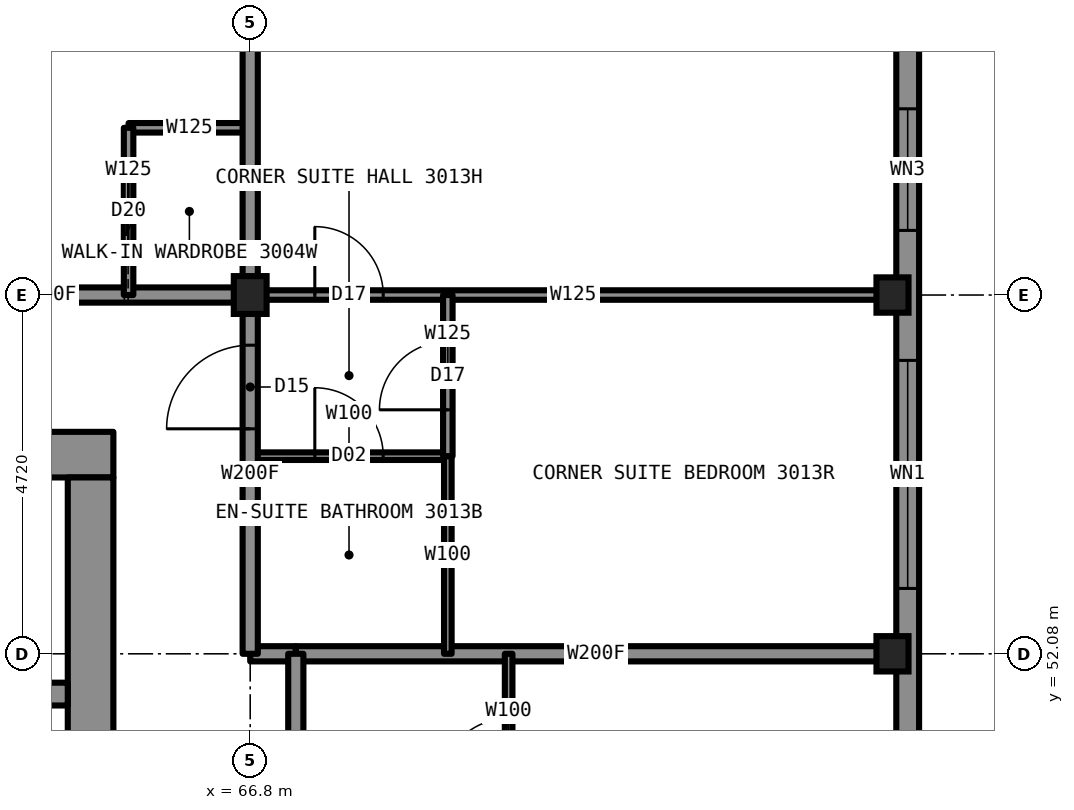
"""IFC4 building model, lengths in metres.
Left out: names, types, materials, properties, quantities, classifications, styles, units other than length and angle.
Written with IfcOpenShell. Run it as: python <this file> out.ifc"""

import sys

from ifc_helpers import new_model, si_unit, direction, frame, frame_2d, origin, origin_2d, place, context, subcontext, project, spatial, rectangle, i_section, extrude, element, fill, save


model = new_model("IFC4")
c1 = context("Model", 3, precision=1e-05, world=origin(), true_north=direction((0.0, 1.0)))
c2 = subcontext(c1, "Body", "Model", "MODEL_VIEW")
j1 = project(units=[si_unit("LENGTHUNIT", "METRE"), si_unit("PLANEANGLEUNIT", "RADIAN")], contexts=[c1])
p1 = place(None, origin())
s1 = spatial("IfcSite", under=j1, at=p1, CompositionType="ELEMENT")
p2 = place(p1, origin())
s2 = spatial("IfcBuilding", under=s1, at=p2, CompositionType="ELEMENT")
p3 = place(p2, frame((0.0, 0.0, 114.4)))
s3 = spatial("IfcBuildingStorey", under=s2, at=p3, CompositionType="ELEMENT", Elevation=114.4)
for number, where, z_axis, x_axis in (
    (1, (75.25, 52.08, 0.0), (0.0, 0.0, 1.0), (1.0, 0.0, 0.0)),
    (2, (75.25, 56.8, 0.0), (0.0, 0.0, 1.0), (1.0, 0.0, 0.0)),
):
    element("IfcColumn", number, at=place(p3, frame(where, z_axis=z_axis, x_axis=x_axis)), inside=s3, PredefinedType="COLUMN", context=c2, shape_type="SweptSolid", body=[
        extrude(i_section(OverallWidth=0.422, OverallDepth=0.465, WebThickness=0.045, FlangeThickness=0.073, at=origin_2d()), origin(), (0.0, 0.0, 1.0), 3.5),
    ])
p4 = place(p3, frame((66.8, 56.8, 0.0), z_axis=(0.0, 0.0, 1.0), x_axis=(1.0, 0.0, 0.0)))
e3 = element("IfcColumn", 3, at=p4, inside=s3, PredefinedType="COLUMN", context=c2, shape_type="SweptSolid", body=[
    extrude(i_section(OverallWidth=0.432, OverallDepth=0.498, WebThickness=0.056, FlangeThickness=0.089, at=origin_2d()), origin(), (0.0, 0.0, 1.0), 3.5),
])
p5 = place(p3, frame((45.0, 54.7, 0.0), z_axis=(0.0, 0.0, 1.0), x_axis=(1.0, 0.0, 0.0)))
e4 = element("IfcWall", 4, at=p5, inside=s3, PredefinedType="SHEAR", context=c2, shape_type="SweptSolid", body=[
    extrude(rectangle(XDim=20.0, YDim=0.6, at=frame_2d((10.0, 0.0))), origin(), (0.0, 0.0, 1.0), 3.5),
])
p6 = place(p3, frame((64.7, 35.6, 0.0), z_axis=(0.0, 0.0, 1.0), x_axis=(0.0, 1.0, 0.0)))
e5 = element("IfcWall", 5, at=p6, inside=s3, PredefinedType="SHEAR", context=c2, shape_type="SweptSolid", body=[
    extrude(rectangle(XDim=18.8, YDim=0.6, at=frame_2d((9.4, 0.0))), origin(), (0.0, 0.0, 1.0), 3.5),
])
p7 = place(p6, frame((13.4, 0.0, 0.0)))
e6 = element("IfcOpeningElement", 6, at=p7, cuts=e5, PredefinedType="OPENING", context=c2, shape_type="SweptSolid", body=[
    extrude(rectangle(XDim=1.8, YDim=2.2, at=frame_2d((0.9, 1.1))), frame((0.0, 0.31, 0.0), z_axis=(0.0, -1.0, 0.0), x_axis=(1.0, 0.0, 0.0)), (0.0, 0.0, 1.0), 0.62),
])
p8 = place(p6, frame((3.6, 0.0, 0.0)))
e7 = element("IfcOpeningElement", 7, at=p8, cuts=e5, PredefinedType="OPENING", context=c2, shape_type="SweptSolid", body=[
    extrude(rectangle(XDim=1.8, YDim=2.2, at=frame_2d((0.9, 1.1))), frame((0.0, 0.31, 0.0), z_axis=(0.0, -1.0, 0.0), x_axis=(1.0, 0.0, 0.0)), (0.0, 0.0, 1.0), 0.62),
])
p9 = place(p3, frame((45.6, 51.55, 0.0), z_axis=(0.0, 0.0, 1.0), x_axis=(1.0, 0.0, 0.0)))
e8 = element("IfcWall", 8, at=p9, inside=s3, PredefinedType="SHEAR", context=c2, shape_type="SweptSolid", body=[
    extrude(rectangle(XDim=18.8, YDim=0.3, at=frame_2d((9.4, 0.0))), origin(), (0.0, 0.0, 1.0), 3.5),
])
p10 = place(p9, frame((0.7, 0.0, 0.0)))
e9 = element("IfcOpeningElement", 9, at=p10, cuts=e8, PredefinedType="OPENING", context=c2, shape_type="SweptSolid", body=[
    extrude(rectangle(XDim=1.1, YDim=2.2, at=frame_2d((0.55, 1.1))), frame((0.0, 0.16, 0.0), z_axis=(0.0, -1.0, 0.0), x_axis=(1.0, 0.0, 0.0)), (0.0, 0.0, 1.0), 0.32),
])
p11 = place(p9, frame((3.4, 0.0, 0.0)))
e10 = element("IfcOpeningElement", 10, at=p11, cuts=e8, PredefinedType="OPENING", context=c2, shape_type="SweptSolid", body=[
    extrude(rectangle(XDim=1.1, YDim=2.2, at=frame_2d((0.55, 1.1))), frame((0.0, 0.16, 0.0), z_axis=(0.0, -1.0, 0.0), x_axis=(1.0, 0.0, 0.0)), (0.0, 0.0, 1.0), 0.32),
])
p12 = place(p9, frame((6.1, 0.0, 0.0)))
e11 = element("IfcOpeningElement", 11, at=p12, cuts=e8, PredefinedType="OPENING", context=c2, shape_type="SweptSolid", body=[
    extrude(rectangle(XDim=1.1, YDim=2.2, at=frame_2d((0.55, 1.1))), frame((0.0, 0.16, 0.0), z_axis=(0.0, -1.0, 0.0), x_axis=(1.0, 0.0, 0.0)), (0.0, 0.0, 1.0), 0.32),
])
p13 = place(p9, frame((8.8, 0.0, 0.0)))
e12 = element("IfcOpeningElement", 12, at=p13, cuts=e8, PredefinedType="OPENING", context=c2, shape_type="SweptSolid", body=[
    extrude(rectangle(XDim=1.1, YDim=2.2, at=frame_2d((0.55, 1.1))), frame((0.0, 0.16, 0.0), z_axis=(0.0, -1.0, 0.0), x_axis=(1.0, 0.0, 0.0)), (0.0, 0.0, 1.0), 0.32),
])
p14 = place(p9, frame((11.6, 0.0, 0.0)))
e13 = element("IfcOpeningElement", 13, at=p14, cuts=e8, PredefinedType="OPENING", context=c2, shape_type="SweptSolid", body=[
    extrude(rectangle(XDim=1.1, YDim=2.2, at=frame_2d((0.55, 1.1))), frame((0.0, 0.16, 0.0), z_axis=(0.0, -1.0, 0.0), x_axis=(1.0, 0.0, 0.0)), (0.0, 0.0, 1.0), 0.32),
])
p15 = place(p9, frame((14.3, 0.0, 0.0)))
e14 = element("IfcOpeningElement", 14, at=p15, cuts=e8, PredefinedType="OPENING", context=c2, shape_type="SweptSolid", body=[
    extrude(rectangle(XDim=1.1, YDim=2.2, at=frame_2d((0.55, 1.1))), frame((0.0, 0.16, 0.0), z_axis=(0.0, -1.0, 0.0), x_axis=(1.0, 0.0, 0.0)), (0.0, 0.0, 1.0), 0.32),
])
p16 = place(p3, frame((43.2, 56.8, 0.0), z_axis=(0.0, 0.0, 1.0), x_axis=(1.0, 0.0, 0.0)))
e15 = element("IfcWall", 15, at=p16, inside=s3, PredefinedType="PARTITIONING", context=c2, shape_type="SweptSolid", body=[
    extrude(rectangle(XDim=23.6, YDim=0.2, at=frame_2d((11.8, 0.0))), origin(), (0.0, 0.0, 1.0), 3.33),
])
p17 = place(p16, frame((2.26, 0.0, 0.0)))
e16 = element("IfcOpeningElement", 16, at=p17, cuts=e15, PredefinedType="OPENING", context=c2, shape_type="SweptSolid", body=[
    extrude(rectangle(XDim=1.0, YDim=2.2, at=frame_2d((0.5, 1.1))), frame((0.0, 0.11, 0.0), z_axis=(0.0, -1.0, 0.0), x_axis=(1.0, 0.0, 0.0)), (0.0, 0.0, 1.0), 0.22),
])
p18 = place(p16, frame((6.18, 0.0, 0.0)))
e17 = element("IfcOpeningElement", 17, at=p18, cuts=e15, PredefinedType="OPENING", context=c2, shape_type="SweptSolid", body=[
    extrude(rectangle(XDim=1.0, YDim=2.2, at=frame_2d((0.5, 1.1))), frame((0.0, 0.11, 0.0), z_axis=(0.0, -1.0, 0.0), x_axis=(1.0, 0.0, 0.0)), (0.0, 0.0, 1.0), 0.22),
])
p19 = place(p16, frame((11.99, 0.0, 0.0)))
e18 = element("IfcOpeningElement", 18, at=p19, cuts=e15, PredefinedType="OPENING", context=c2, shape_type="SweptSolid", body=[
    extrude(rectangle(XDim=1.0, YDim=2.2, at=frame_2d((0.5, 1.1))), frame((0.0, 0.11, 0.0), z_axis=(0.0, -1.0, 0.0), x_axis=(1.0, 0.0, 0.0)), (0.0, 0.0, 1.0), 0.22),
])
p20 = place(p16, frame((17.16, 0.0, 0.0)))
e19 = element("IfcOpeningElement", 19, at=p20, cuts=e15, PredefinedType="OPENING", context=c2, shape_type="SweptSolid", body=[
    extrude(rectangle(XDim=1.0, YDim=2.2, at=frame_2d((0.5, 1.1))), frame((0.0, 0.11, 0.0), z_axis=(0.0, -1.0, 0.0), x_axis=(1.0, 0.0, 0.0)), (0.0, 0.0, 1.0), 0.22),
])
p21 = place(p3, frame((66.8, 56.8, 0.0), z_axis=(0.0, 0.0, 1.0), x_axis=(1.0, 0.0, 0.0)))
e20 = element("IfcWall", 20, at=p21, inside=s3, PredefinedType="PARTITIONING", context=c2, shape_type="SweptSolid", body=[
    extrude(rectangle(XDim=8.5, YDim=0.125, at=frame_2d((4.25, 0.0))), origin(), (0.0, 0.0, 1.0), 2.573),
])
p22 = place(p21, frame((0.85, 0.0, 0.0)))
e21 = element("IfcOpeningElement", 21, at=p22, cuts=e20, PredefinedType="OPENING", context=c2, shape_type="SweptSolid", body=[
    extrude(rectangle(XDim=0.9, YDim=2.2, at=frame_2d((0.45, 1.1))), frame((0.0, 0.073, 0.0), z_axis=(0.0, -1.0, 0.0), x_axis=(1.0, 0.0, 0.0)), (0.0, 0.0, 1.0), 0.145),
])
p23 = place(p3, frame((65.2, 59.0, 0.0), z_axis=(0.0, 0.0, 1.0), x_axis=(1.0, 0.0, 0.0)))
e22 = element("IfcWall", 22, at=p23, inside=s3, PredefinedType="PARTITIONING", context=c2, shape_type="SweptSolid", body=[
    extrude(rectangle(XDim=1.6, YDim=0.125, at=frame_2d((0.8, 0.0))), origin(), (0.0, 0.0, 1.0), 3.33),
])
p24 = place(p3, frame((66.8, 52.08, 0.0), z_axis=(0.0, 0.0, 1.0), x_axis=(1.0, 0.0, 0.0)))
e23 = element("IfcWall", 23, at=p24, inside=s3, PredefinedType="PARTITIONING", context=c2, shape_type="SweptSolid", body=[
    extrude(rectangle(XDim=0.6, YDim=0.2, at=frame_2d((0.3, 0.0))), origin(), (0.0, 0.0, 1.0), 2.573),
])
p25 = place(p3, frame((67.4, 52.08, 0.0), z_axis=(0.0, 0.0, 1.0), x_axis=(1.0, 0.0, 0.0)))
e24 = element("IfcWall", 24, at=p25, inside=s3, PredefinedType="PARTITIONING", context=c2, shape_type="SweptSolid", body=[
    extrude(rectangle(XDim=7.9, YDim=0.2, at=frame_2d((3.95, 0.0))), origin(), (0.0, 0.0, 1.0), 2.573),
])
p26 = place(p3, frame((66.8, 54.68, 0.0), z_axis=(0.0, 0.0, 1.0), x_axis=(1.0, 0.0, 0.0)))
e25 = element("IfcWall", 25, at=p26, inside=s3, PredefinedType="PARTITIONING", context=c2, shape_type="SweptSolid", body=[
    extrude(rectangle(XDim=2.6, YDim=0.1, at=frame_2d((1.3, 0.0))), origin(), (0.0, 0.0, 1.0), 3.33),
])
p27 = place(p26, frame((0.85, 0.0, 0.0)))
e26 = element("IfcOpeningElement", 26, at=p27, cuts=e25, PredefinedType="OPENING", context=c2, shape_type="SweptSolid", body=[
    extrude(rectangle(XDim=0.9, YDim=2.1, at=frame_2d((0.45, 1.05))), frame((0.0, 0.06, 0.0), z_axis=(0.0, -1.0, 0.0), x_axis=(1.0, 0.0, 0.0)), (0.0, 0.0, 1.0), 0.12),
])
p28 = place(p3, frame((65.2, 56.8, 0.0), z_axis=(0.0, 0.0, 1.0), x_axis=(0.0, 1.0, 0.0)))
e27 = element("IfcWall", 27, at=p28, inside=s3, PredefinedType="PARTITIONING", context=c2, shape_type="SweptSolid", body=[
    extrude(rectangle(XDim=2.2, YDim=0.125, at=frame_2d((1.1, 0.0))), origin(), (0.0, 0.0, 1.0), 3.33),
])
p29 = place(p28, frame((0.7, 0.0, 0.0)))
e28 = element("IfcOpeningElement", 28, at=p29, cuts=e27, PredefinedType="OPENING", context=c2, shape_type="SweptSolid", body=[
    extrude(rectangle(XDim=0.8, YDim=2.1, at=frame_2d((0.4, 1.05))), frame((0.0, 0.073, 0.0), z_axis=(0.0, -1.0, 0.0), x_axis=(1.0, 0.0, 0.0)), (0.0, 0.0, 1.0), 0.145),
])
p30 = place(p3, frame((66.8, 52.08, 0.0), z_axis=(0.0, 0.0, 1.0), x_axis=(0.0, 1.0, 0.0)))
e29 = element("IfcWall", 29, at=p30, inside=s3, PredefinedType="PARTITIONING", context=c2, shape_type="SweptSolid", body=[
    extrude(rectangle(XDim=4.72, YDim=0.2, at=frame_2d((2.36, 0.0))), origin(), (0.0, 0.0, 1.0), 3.33),
])
p31 = place(p30, frame((2.96, 0.0, 0.0)))
e30 = element("IfcOpeningElement", 30, at=p31, cuts=e29, PredefinedType="OPENING", context=c2, shape_type="SweptSolid", body=[
    extrude(rectangle(XDim=1.1, YDim=2.2, at=frame_2d((0.55, 1.1))), frame((0.0, 0.11, 0.0), z_axis=(0.0, -1.0, 0.0), x_axis=(1.0, 0.0, 0.0)), (0.0, 0.0, 1.0), 0.22),
])
p32 = place(p3, frame((66.8, 56.8, 0.0), z_axis=(0.0, 0.0, 1.0), x_axis=(0.0, 1.0, 0.0)))
e31 = element("IfcWall", 31, at=p32, inside=s3, PredefinedType="PARTITIONING", context=c2, shape_type="SweptSolid", body=[
    extrude(rectangle(XDim=8.5, YDim=0.2, at=frame_2d((4.25, 0.0))), origin(), (0.0, 0.0, 1.0), 2.573),
])
p33 = place(p3, frame((67.4, 37.92, 0.0), z_axis=(0.0, 0.0, 1.0), x_axis=(0.0, 1.0, 0.0)))
e32 = element("IfcWall", 32, at=p33, inside=s3, PredefinedType="PARTITIONING", context=c2, shape_type="SweptSolid", body=[
    extrude(rectangle(XDim=14.16, YDim=0.2, at=frame_2d((7.08, 0.0))), origin(), (0.0, 0.0, 1.0), 3.33),
])
p34 = place(p33, frame((2.55, 0.0, 0.0)))
e33 = element("IfcOpeningElement", 33, at=p34, cuts=e32, PredefinedType="OPENING", context=c2, shape_type="SweptSolid", body=[
    extrude(rectangle(XDim=1.0, YDim=2.2, at=frame_2d((0.5, 1.1))), frame((0.0, 0.11, 0.0), z_axis=(0.0, -1.0, 0.0), x_axis=(1.0, 0.0, 0.0)), (0.0, 0.0, 1.0), 0.22),
])
p35 = place(p33, frame((6.18, 0.0, 0.0)))
e34 = element("IfcOpeningElement", 34, at=p35, cuts=e32, PredefinedType="OPENING", context=c2, shape_type="SweptSolid", body=[
    extrude(rectangle(XDim=1.0, YDim=2.2, at=frame_2d((0.5, 1.1))), frame((0.0, 0.11, 0.0), z_axis=(0.0, -1.0, 0.0), x_axis=(1.0, 0.0, 0.0)), (0.0, 0.0, 1.0), 0.22),
])
p36 = place(p33, frame((9.84, 0.0, 0.0)))
e35 = element("IfcOpeningElement", 35, at=p36, cuts=e32, PredefinedType="OPENING", context=c2, shape_type="SweptSolid", body=[
    extrude(rectangle(XDim=1.0, YDim=2.2, at=frame_2d((0.5, 1.1))), frame((0.0, 0.11, 0.0), z_axis=(0.0, -1.0, 0.0), x_axis=(1.0, 0.0, 0.0)), (0.0, 0.0, 1.0), 0.22),
])
p37 = place(p3, frame((69.4, 52.08, 0.0), z_axis=(0.0, 0.0, 1.0), x_axis=(0.0, 1.0, 0.0)))
e36 = element("IfcWall", 36, at=p37, inside=s3, PredefinedType="PARTITIONING", context=c2, shape_type="SweptSolid", body=[
    extrude(rectangle(XDim=2.6, YDim=0.1, at=frame_2d((1.3, 0.0))), origin(), (0.0, 0.0, 1.0), 3.33),
])
p38 = place(p3, frame((69.4, 54.68, 0.0), z_axis=(0.0, 0.0, 1.0), x_axis=(0.0, 1.0, 0.0)))
e37 = element("IfcWall", 37, at=p38, inside=s3, PredefinedType="PARTITIONING", context=c2, shape_type="SweptSolid", body=[
    extrude(rectangle(XDim=2.12, YDim=0.125, at=frame_2d((1.06, 0.0))), origin(), (0.0, 0.0, 1.0), 3.33),
])
p39 = place(p38, frame((0.61, 0.0, 0.0)))
e38 = element("IfcOpeningElement", 38, at=p39, cuts=e37, PredefinedType="OPENING", context=c2, shape_type="SweptSolid", body=[
    extrude(rectangle(XDim=0.9, YDim=2.2, at=frame_2d((0.45, 1.1))), frame((0.0, 0.073, 0.0), z_axis=(0.0, -1.0, 0.0), x_axis=(1.0, 0.0, 0.0)), (0.0, 0.0, 1.0), 0.145),
])
p40 = place(p3, frame((70.2, 49.48, 0.0), z_axis=(0.0, 0.0, 1.0), x_axis=(0.0, 1.0, 0.0)))
e39 = element("IfcWall", 39, at=p40, inside=s3, PredefinedType="PARTITIONING", context=c2, shape_type="SweptSolid", body=[
    extrude(rectangle(XDim=2.6, YDim=0.1, at=frame_2d((1.3, 0.0))), origin(), (0.0, 0.0, 1.0), 3.33),
])
p41 = place(p40, frame((0.85, 0.0, 0.0)))
e40 = element("IfcOpeningElement", 40, at=p41, cuts=e39, PredefinedType="OPENING", context=c2, shape_type="SweptSolid", body=[
    extrude(rectangle(XDim=0.9, YDim=2.1, at=frame_2d((0.45, 1.05))), frame((0.0, 0.06, 0.0), z_axis=(0.0, -1.0, 0.0), x_axis=(1.0, 0.0, 0.0)), (0.0, 0.0, 1.0), 0.12),
])
p42 = place(p3, frame((75.45, 29.9, 0.0), z_axis=(0.0, 0.0, 1.0), x_axis=(0.0, 1.0, 0.0)))
e41 = element("IfcWall", 41, at=p42, inside=s3, PredefinedType="SOLIDWALL", context=c2, shape_type="SweptSolid", body=[
    extrude(rectangle(XDim=30.2, YDim=0.3, at=frame_2d((15.1, 0.0))), origin(), (0.0, 0.0, 1.0), 2.83),
])
p43 = place(p42, frame((0.85, 0.0, 0.5)))
e42 = element("IfcOpeningElement", 42, at=p43, cuts=e41, PredefinedType="OPENING", context=c2, shape_type="SweptSolid", body=[
    extrude(rectangle(XDim=1.6, YDim=2.0, at=frame_2d((0.8, 1.0))), frame((0.0, 0.16, 0.0), z_axis=(0.0, -1.0, 0.0), x_axis=(1.0, 0.0, 0.0)), (0.0, 0.0, 1.0), 0.32),
])
p44 = place(p42, frame((4.16, 0.0, 0.5)))
e43 = element("IfcOpeningElement", 43, at=p44, cuts=e41, PredefinedType="OPENING", context=c2, shape_type="SweptSolid", body=[
    extrude(rectangle(XDim=3.0, YDim=2.0, at=frame_2d((1.5, 1.0))), frame((0.0, 0.16, 0.0), z_axis=(0.0, -1.0, 0.0), x_axis=(1.0, 0.0, 0.0)), (0.0, 0.0, 1.0), 0.32),
])
p45 = place(p42, frame((10.53, 0.0, 0.5)))
e44 = element("IfcOpeningElement", 44, at=p45, cuts=e41, PredefinedType="OPENING", context=c2, shape_type="SweptSolid", body=[
    extrude(rectangle(XDim=1.3, YDim=1.9, at=frame_2d((0.65, 0.95))), frame((0.0, 0.16, 0.0), z_axis=(0.0, -1.0, 0.0), x_axis=(1.0, 0.0, 0.0)), (0.0, 0.0, 1.0), 0.32),
])
p46 = place(p42, frame((13.6, 0.0, 0.5)))
e45 = element("IfcOpeningElement", 45, at=p46, cuts=e41, PredefinedType="OPENING", context=c2, shape_type="SweptSolid", body=[
    extrude(rectangle(XDim=3.0, YDim=2.0, at=frame_2d((1.5, 1.0))), frame((0.0, 0.16, 0.0), z_axis=(0.0, -1.0, 0.0), x_axis=(1.0, 0.0, 0.0)), (0.0, 0.0, 1.0), 0.32),
])
p47 = place(p42, frame((18.32, 0.0, 0.5)))
e46 = element("IfcOpeningElement", 46, at=p47, cuts=e41, PredefinedType="OPENING", context=c2, shape_type="SweptSolid", body=[
    extrude(rectangle(XDim=1.3, YDim=1.9, at=frame_2d((0.65, 0.95))), frame((0.0, 0.16, 0.0), z_axis=(0.0, -1.0, 0.0), x_axis=(1.0, 0.0, 0.0)), (0.0, 0.0, 1.0), 0.32),
])
p48 = place(p42, frame((23.04, 0.0, 0.5)))
e47 = element("IfcOpeningElement", 47, at=p48, cuts=e41, PredefinedType="OPENING", context=c2, shape_type="SweptSolid", body=[
    extrude(rectangle(XDim=3.0, YDim=2.0, at=frame_2d((1.5, 1.0))), frame((0.0, 0.16, 0.0), z_axis=(0.0, -1.0, 0.0), x_axis=(1.0, 0.0, 0.0)), (0.0, 0.0, 1.0), 0.32),
])
p49 = place(p42, frame((27.75, 0.0, 0.5)))
e48 = element("IfcOpeningElement", 48, at=p49, cuts=e41, PredefinedType="OPENING", context=c2, shape_type="SweptSolid", body=[
    extrude(rectangle(XDim=1.6, YDim=2.0, at=frame_2d((0.8, 1.0))), frame((0.0, 0.16, 0.0), z_axis=(0.0, -1.0, 0.0), x_axis=(1.0, 0.0, 0.0)), (0.0, 0.0, 1.0), 0.32),
])
p50 = place(p42, frame((9.88, 0.0, 0.5)))
e49 = element("IfcOpeningElement", 49, at=p50, cuts=e41, PredefinedType="OPENING", context=c2, shape_type="SweptSolid", body=[
    extrude(rectangle(XDim=0.6, YDim=0.9, at=frame_2d((0.3, 0.45))), frame((0.0, 0.16, 0.0), z_axis=(0.0, -1.0, 0.0), x_axis=(1.0, 0.0, 0.0)), (0.0, 0.0, 1.0), 0.32),
])
p51 = place(p42, frame((19.67, 0.0, 0.5)))
e50 = element("IfcOpeningElement", 50, at=p51, cuts=e41, PredefinedType="OPENING", context=c2, shape_type="SweptSolid", body=[
    extrude(rectangle(XDim=0.6, YDim=0.9, at=frame_2d((0.3, 0.45))), frame((0.0, 0.16, 0.0), z_axis=(0.0, -1.0, 0.0), x_axis=(1.0, 0.0, 0.0)), (0.0, 0.0, 1.0), 0.32),
])
p52 = place(p29, origin())
e51 = element("IfcDoor", 51, at=p52, inside=s3, OperationType="SLIDING_TO_LEFT", PredefinedType="DOOR", context=c2, shape_type="SweptSolid", body=[
    extrude(rectangle(XDim=0.8, YDim=2.1, at=frame_2d((0.4, 1.05))), frame((0.0, 0.025, 0.0), z_axis=(0.0, -1.0, 0.0), x_axis=(1.0, 0.0, 0.0)), (0.0, 0.0, 1.0), 0.05),
])
fill(e28, e51)
p53 = place(p41, origin())
e52 = element("IfcDoor", 52, at=p53, inside=s3, OperationType="SINGLE_SWING_RIGHT", PredefinedType="DOOR", context=c2, shape_type="SweptSolid", body=[
    extrude(rectangle(XDim=0.9, YDim=2.1, at=frame_2d((0.45, 1.05))), frame((0.0, 0.025, 0.0), z_axis=(0.0, -1.0, 0.0), x_axis=(1.0, 0.0, 0.0)), (0.0, 0.0, 1.0), 0.05),
])
fill(e40, e52)
p54 = place(p22, origin())
e53 = element("IfcDoor", 53, at=p54, inside=s3, OperationType="SINGLE_SWING_LEFT", PredefinedType="DOOR", context=c2, shape_type="SweptSolid", body=[
    extrude(rectangle(XDim=0.9, YDim=2.2, at=frame_2d((0.45, 1.1))), frame((0.0, 0.025, 0.0), z_axis=(0.0, -1.0, 0.0), x_axis=(1.0, 0.0, 0.0)), (0.0, 0.0, 1.0), 0.05),
])
fill(e21, e53)
p55 = place(p27, origin())
e54 = element("IfcDoor", 54, at=p55, inside=s3, OperationType="SINGLE_SWING_RIGHT", PredefinedType="DOOR", context=c2, shape_type="SweptSolid", body=[
    extrude(rectangle(XDim=0.9, YDim=2.1, at=frame_2d((0.45, 1.05))), frame((0.0, 0.025, 0.0), z_axis=(0.0, -1.0, 0.0), x_axis=(1.0, 0.0, 0.0)), (0.0, 0.0, 1.0), 0.05),
])
fill(e26, e54)
p56 = place(p31, origin())
e55 = element("IfcDoor", 55, at=p56, inside=s3, OperationType="SINGLE_SWING_LEFT", PredefinedType="DOOR", context=c2, shape_type="SweptSolid", body=[
    extrude(rectangle(XDim=1.1, YDim=2.2, at=frame_2d((0.55, 1.1))), frame((0.0, 0.025, 0.0), z_axis=(0.0, -1.0, 0.0), x_axis=(1.0, 0.0, 0.0)), (0.0, 0.0, 1.0), 0.05),
])
fill(e30, e55)
p57 = place(p39, origin())
e56 = element("IfcDoor", 56, at=p57, inside=s3, OperationType="SINGLE_SWING_LEFT", PredefinedType="DOOR", context=c2, shape_type="SweptSolid", body=[
    extrude(rectangle(XDim=0.9, YDim=2.2, at=frame_2d((0.45, 1.1))), frame((0.0, 0.025, 0.0), z_axis=(0.0, -1.0, 0.0), x_axis=(1.0, 0.0, 0.0)), (0.0, 0.0, 1.0), 0.05),
])
fill(e38, e56)
p58 = place(p48, origin())
e57 = element("IfcWindow", 57, at=p58, inside=s3, PartitioningType="SINGLE_PANEL", PredefinedType="WINDOW", context=c2, shape_type="SweptSolid", body=[
    extrude(rectangle(XDim=3.0, YDim=2.0, at=frame_2d((1.5, 1.0))), frame((0.0, 0.03, 0.0), z_axis=(0.0, -1.0, 0.0), x_axis=(1.0, 0.0, 0.0)), (0.0, 0.0, 1.0), 0.06),
])
fill(e47, e57)
p59 = place(p49, origin())
e58 = element("IfcWindow", 58, at=p59, inside=s3, PartitioningType="SINGLE_PANEL", PredefinedType="WINDOW", context=c2, shape_type="SweptSolid", body=[
    extrude(rectangle(XDim=1.6, YDim=2.0, at=frame_2d((0.8, 1.0))), frame((0.0, 0.03, 0.0), z_axis=(0.0, -1.0, 0.0), x_axis=(1.0, 0.0, 0.0)), (0.0, 0.0, 1.0), 0.06),
])
fill(e48, e58)
save(model, sys.argv[1])
